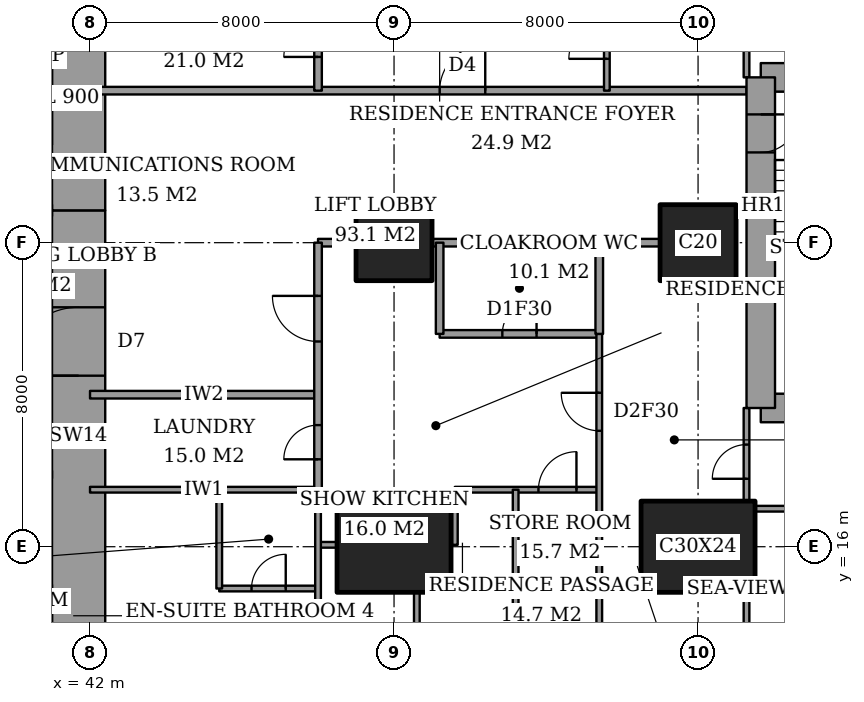
"""IFC4 building model, lengths in metres.
Left out: names, types, materials, properties, quantities, classifications, styles, units other than length and angle.
Written with IfcOpenShell. Run it as: python <this file> out.ifc"""

import sys

from ifc_helpers import new_model, si_unit, direction, frame, frame_2d, origin, origin_2d, place, context, subcontext, project, spatial, rectangle, extrude, element, fill, save


model = new_model("IFC4")
c1 = context("Model", 3, precision=1e-05, world=origin(), true_north=direction((0.0, 1.0)))
c2 = subcontext(c1, "Body", "Model", "MODEL_VIEW")
j1 = project(units=[si_unit("LENGTHUNIT", "METRE"), si_unit("PLANEANGLEUNIT", "RADIAN")], contexts=[c1])
p1 = place(None, origin())
s1 = spatial("IfcSite", under=j1, at=p1, CompositionType="ELEMENT")
p2 = place(p1, origin())
s2 = spatial("IfcBuilding", under=s1, at=p2, CompositionType="ELEMENT")
p3 = place(p2, frame((0.0, 0.0, 54.8)))
s3 = spatial("IfcBuildingStorey", under=s2, at=p3, CompositionType="ELEMENT", Elevation=54.8)
p4 = place(p3, frame((50.0, 16.0, 0.0), z_axis=(0.0, 0.0, 1.0), x_axis=(1.0, 0.0, 0.0)))
e1 = element("IfcColumn", 1, at=p4, inside=s3, PredefinedType="COLUMN", context=c2, shape_type="SweptSolid", body=[
    extrude(rectangle(XDim=3.0, YDim=2.4, at=origin_2d()), origin(), (0.0, 0.0, 1.0), 3.6),
])
p5 = place(p3, frame((50.0, 24.0, 0.0), z_axis=(0.0, 0.0, 1.0), x_axis=(1.0, 0.0, 0.0)))
e2 = element("IfcColumn", 2, at=p5, inside=s3, PredefinedType="COLUMN", context=c2, shape_type="SweptSolid", body=[
    extrude(rectangle(XDim=2.0, YDim=2.0, at=origin_2d()), origin(), (0.0, 0.0, 1.0), 3.6),
])
p6 = place(p3, frame((58.0, 16.0, 0.0), z_axis=(0.0, 0.0, 1.0), x_axis=(1.0, 0.0, 0.0)))
e3 = element("IfcColumn", 3, at=p6, inside=s3, PredefinedType="COLUMN", context=c2, shape_type="SweptSolid", body=[
    extrude(rectangle(XDim=3.0, YDim=2.4, at=origin_2d()), origin(), (0.0, 0.0, 1.0), 3.6),
])
p7 = place(p3, frame((58.0, 24.0, 0.0), z_axis=(0.0, 0.0, 1.0), x_axis=(1.0, 0.0, 0.0)))
e4 = element("IfcColumn", 4, at=p7, inside=s3, PredefinedType="COLUMN", context=c2, shape_type="SweptSolid", body=[
    extrude(rectangle(XDim=2.0, YDim=2.0, at=origin_2d()), origin(), (0.0, 0.0, 1.0), 3.6),
])
p8 = place(p3, frame((41.7, 13.0, 0.0), z_axis=(0.0, 0.0, 1.0), x_axis=(0.0, 1.0, 0.0)))
e5 = element("IfcWall", 5, at=p8, inside=s3, PredefinedType="SHEAR", context=c2, shape_type="SweptSolid", body=[
    extrude(rectangle(XDim=11.85, YDim=1.4, at=frame_2d((5.925, 0.0))), origin(), (0.0, 0.0, 1.0), 3.6),
])
p9 = place(p8, frame((7.5, 0.0, 0.0)))
e6 = element("IfcOpeningElement", 6, at=p9, cuts=e5, PredefinedType="OPENING", context=c2, shape_type="SweptSolid", body=[
    extrude(rectangle(XDim=1.8, YDim=2.4, at=frame_2d((0.9, 1.2))), frame((0.0, 0.71, 0.0), z_axis=(0.0, -1.0, 0.0), x_axis=(1.0, 0.0, 0.0)), (0.0, 0.0, 1.0), 1.42),
])
p10 = place(p3, frame((41.7, 24.85, 0.0), z_axis=(0.0, 0.0, 1.0), x_axis=(0.0, 1.0, 0.0)))
e7 = element("IfcWall", 7, at=p10, inside=s3, PredefinedType="SHEAR", context=c2, shape_type="SweptSolid", body=[
    extrude(rectangle(XDim=10.15, YDim=1.4, at=frame_2d((5.075, 0.0))), origin(), (0.0, 0.0, 1.0), 3.6),
])
for number, where, z_axis, x_axis in (
    (8, (59.65, 19.65, 0.0), (0.0, 0.0, 1.0), (1.0, 0.0, 0.0)),
    (9, (64.1, 28.35, 0.0), (0.0, 0.0, 1.0), (-1.0, 0.0, 0.0)),
):
    element("IfcWall", number, at=place(p3, frame(where, z_axis=z_axis, x_axis=x_axis)), inside=s3, PredefinedType="SHEAR", context=c2, shape_type="SweptSolid", body=[
        extrude(rectangle(XDim=4.45, YDim=0.75, at=frame_2d((2.225, 0.0))), origin(), (0.0, 0.0, 1.0), 3.6),
    ])
p11 = place(p3, frame((59.65, 28.35, 0.0), z_axis=(0.0, 0.0, 1.0), x_axis=(0.0, -1.0, 0.0)))
e10 = element("IfcWall", 10, at=p11, inside=s3, PredefinedType="SHEAR", context=c2, shape_type="SweptSolid", body=[
    extrude(rectangle(XDim=8.7, YDim=0.75, at=frame_2d((4.35, 0.0))), origin(), (0.0, 0.0, 1.0), 3.6),
])
p12 = place(p11, frame((0.975, 0.0, 0.0)))
e11 = element("IfcOpeningElement", 11, at=p12, cuts=e10, PredefinedType="OPENING", context=c2, shape_type="SweptSolid", body=[
    extrude(rectangle(XDim=1.0, YDim=2.1, at=frame_2d((0.5, 1.05))), frame((0.0, 0.385, 0.0), z_axis=(0.0, -1.0, 0.0), x_axis=(1.0, 0.0, 0.0)), (0.0, 0.0, 1.0), 0.77),
])
p13 = place(p3, frame((45.4, 14.9, 0.0), z_axis=(0.0, 0.0, 1.0), x_axis=(1.0, 0.0, 0.0)))
e12 = element("IfcWall", 12, at=p13, inside=s3, PredefinedType="PARTITIONING", context=c2, shape_type="SweptSolid", body=[
    extrude(rectangle(XDim=2.6, YDim=0.15, at=frame_2d((1.3, 0.0))), origin(), (0.0, 0.0, 1.0), 3.35),
])
p14 = place(p13, frame((0.85, 0.0, 0.0)))
e13 = element("IfcOpeningElement", 13, at=p14, cuts=e12, PredefinedType="OPENING", context=c2, shape_type="SweptSolid", body=[
    extrude(rectangle(XDim=0.9, YDim=2.1, at=frame_2d((0.45, 1.05))), frame((0.0, 0.085, 0.0), z_axis=(0.0, -1.0, 0.0), x_axis=(1.0, 0.0, 0.0)), (0.0, 0.0, 1.0), 0.17),
])
p15 = place(p3, frame((55.4, 15.0, 0.0), z_axis=(0.0, 0.0, 1.0), x_axis=(1.0, 0.0, 0.0)))
e14 = element("IfcWall", 14, at=p15, inside=s3, PredefinedType="PARTITIONING", context=c2, shape_type="SweptSolid", body=[
    extrude(rectangle(XDim=1.1, YDim=0.15, at=frame_2d((0.55, 0.0))), origin(), (0.0, 0.0, 1.0), 3.35),
])
p16 = place(p3, frame((48.0, 16.05, 0.0), z_axis=(0.0, 0.0, 1.0), x_axis=(1.0, 0.0, 0.0)))
e15 = element("IfcWall", 15, at=p16, inside=s3, PredefinedType="PARTITIONING", context=c2, shape_type="SweptSolid", body=[
    extrude(rectangle(XDim=0.5, YDim=0.15, at=frame_2d((0.25, 0.0))), origin(), (0.0, 0.0, 1.0), 2.634),
])
p17 = place(p3, frame((59.5, 17.0, 0.0), z_axis=(0.0, 0.0, 1.0), x_axis=(1.0, 0.0, 0.0)))
e16 = element("IfcWall", 16, at=p17, inside=s3, PredefinedType="PARTITIONING", context=c2, shape_type="SweptSolid", body=[
    extrude(rectangle(XDim=5.15, YDim=0.15, at=frame_2d((2.575, 0.0))), origin(), (0.0, 0.0, 1.0), 3.35),
])
p18 = place(p3, frame((42.0, 17.5, 0.0), z_axis=(0.0, 0.0, 1.0), x_axis=(1.0, 0.0, 0.0)))
e17 = element("IfcWall", 17, at=p18, inside=s3, PredefinedType="PARTITIONING", context=c2, shape_type="SweptSolid", body=[
    extrude(rectangle(XDim=6.0, YDim=0.15, at=frame_2d((3.0, 0.0))), origin(), (0.0, 0.0, 1.0), 3.35),
])
p19 = place(p3, frame((51.6, 17.5, 0.0), z_axis=(0.0, 0.0, 1.0), x_axis=(1.0, 0.0, 0.0)))
e18 = element("IfcWall", 18, at=p19, inside=s3, PredefinedType="PARTITIONING", context=c2, shape_type="SweptSolid", body=[
    extrude(rectangle(XDim=3.8, YDim=0.15, at=frame_2d((1.9, 0.0))), origin(), (0.0, 0.0, 1.0), 3.35),
])
p20 = place(p19, frame((2.2, 0.0, 0.0)))
e19 = element("IfcOpeningElement", 19, at=p20, cuts=e18, PredefinedType="OPENING", context=c2, shape_type="SweptSolid", body=[
    extrude(rectangle(XDim=1.0, YDim=2.1, at=frame_2d((0.5, 1.05))), frame((0.0, 0.085, 0.0), z_axis=(0.0, -1.0, 0.0), x_axis=(1.0, 0.0, 0.0)), (0.0, 0.0, 1.0), 0.17),
])
p21 = place(p3, frame((42.0, 20.0, 0.0), z_axis=(0.0, 0.0, 1.0), x_axis=(1.0, 0.0, 0.0)))
e20 = element("IfcWall", 20, at=p21, inside=s3, PredefinedType="PARTITIONING", context=c2, shape_type="SweptSolid", body=[
    extrude(rectangle(XDim=6.0, YDim=0.2, at=frame_2d((3.0, 0.0))), origin(), (0.0, 0.0, 1.0), 3.35),
])
p22 = place(p3, frame((51.2, 21.6, 0.0), z_axis=(0.0, 0.0, 1.0), x_axis=(1.0, 0.0, 0.0)))
e21 = element("IfcWall", 21, at=p22, inside=s3, PredefinedType="PARTITIONING", context=c2, shape_type="SweptSolid", body=[
    extrude(rectangle(XDim=4.2, YDim=0.2, at=frame_2d((2.1, 0.0))), origin(), (0.0, 0.0, 1.0), 3.35),
])
p23 = place(p22, frame((1.65, 0.0, 0.0)))
e22 = element("IfcOpeningElement", 22, at=p23, cuts=e21, PredefinedType="OPENING", context=c2, shape_type="SweptSolid", body=[
    extrude(rectangle(XDim=0.9, YDim=2.1, at=frame_2d((0.45, 1.05))), frame((0.0, 0.11, 0.0), z_axis=(0.0, -1.0, 0.0), x_axis=(1.0, 0.0, 0.0)), (0.0, 0.0, 1.0), 0.22),
])
p24 = place(p3, frame((48.0, 24.0, 0.0), z_axis=(0.0, 0.0, 1.0), x_axis=(1.0, 0.0, 0.0)))
e23 = element("IfcWall", 23, at=p24, inside=s3, PredefinedType="PARTITIONING", context=c2, shape_type="SweptSolid", body=[
    extrude(rectangle(XDim=1.0, YDim=0.2, at=frame_2d((0.5, 0.0))), origin(), (0.0, 0.0, 1.0), 3.35),
])
p25 = place(p3, frame((51.0, 24.0, 0.0), z_axis=(0.0, 0.0, 1.0), x_axis=(1.0, 0.0, 0.0)))
e24 = element("IfcWall", 24, at=p25, inside=s3, PredefinedType="PARTITIONING", context=c2, shape_type="SweptSolid", body=[
    extrude(rectangle(XDim=6.0, YDim=0.2, at=frame_2d((3.0, 0.0))), origin(), (0.0, 0.0, 1.0), 3.35),
])
p26 = place(p3, frame((42.0, 28.0, 0.0), z_axis=(0.0, 0.0, 1.0), x_axis=(1.0, 0.0, 0.0)))
e25 = element("IfcWall", 25, at=p26, inside=s3, PredefinedType="PARTITIONING", context=c2, shape_type="SweptSolid", body=[
    extrude(rectangle(XDim=17.275, YDim=0.2, at=frame_2d((8.637, 0.0))), origin(), (0.0, 0.0, 1.0), 3.35),
])
p27 = place(p26, frame((9.2, 0.0, 0.0)))
e26 = element("IfcOpeningElement", 26, at=p27, cuts=e25, PredefinedType="OPENING", context=c2, shape_type="SweptSolid", body=[
    extrude(rectangle(XDim=1.2, YDim=2.4, at=frame_2d((0.6, 1.2))), frame((0.0, 0.11, 0.0), z_axis=(0.0, -1.0, 0.0), x_axis=(1.0, 0.0, 0.0)), (0.0, 0.0, 1.0), 0.22),
])
p28 = place(p3, frame((45.4, 14.9, 0.0), z_axis=(0.0, 0.0, 1.0), x_axis=(0.0, 1.0, 0.0)))
e27 = element("IfcWall", 27, at=p28, inside=s3, PredefinedType="PARTITIONING", context=c2, shape_type="SweptSolid", body=[
    extrude(rectangle(XDim=2.6, YDim=0.15, at=frame_2d((1.3, 0.0))), origin(), (0.0, 0.0, 1.0), 3.35),
])
p29 = place(p3, frame((48.0, 17.5, 0.0), z_axis=(0.0, 0.0, 1.0), x_axis=(0.0, 1.0, 0.0)))
e28 = element("IfcWall", 28, at=p29, inside=s3, PredefinedType="PARTITIONING", context=c2, shape_type="SweptSolid", body=[
    extrude(rectangle(XDim=6.5, YDim=0.2, at=frame_2d((3.25, 0.0))), origin(), (0.0, 0.0, 1.0), 3.35),
])
p30 = place(p29, frame((3.9, 0.0, 0.0)))
e29 = element("IfcOpeningElement", 29, at=p30, cuts=e28, PredefinedType="OPENING", context=c2, shape_type="SweptSolid", body=[
    extrude(rectangle(XDim=1.2, YDim=2.4, at=frame_2d((0.6, 1.2))), frame((0.0, 0.11, 0.0), z_axis=(0.0, -1.0, 0.0), x_axis=(1.0, 0.0, 0.0)), (0.0, 0.0, 1.0), 0.22),
])
p31 = place(p29, frame((0.8, 0.0, 0.0)))
e30 = element("IfcOpeningElement", 30, at=p31, cuts=e28, PredefinedType="OPENING", context=c2, shape_type="SweptSolid", body=[
    extrude(rectangle(XDim=0.9, YDim=2.1, at=frame_2d((0.45, 1.05))), frame((0.0, 0.11, 0.0), z_axis=(0.0, -1.0, 0.0), x_axis=(1.0, 0.0, 0.0)), (0.0, 0.0, 1.0), 0.22),
])
p32 = place(p3, frame((48.0, 28.0, 0.0), z_axis=(0.0, 0.0, 1.0), x_axis=(0.0, 1.0, 0.0)))
e31 = element("IfcWall", 31, at=p32, inside=s3, PredefinedType="PARTITIONING", context=c2, shape_type="SweptSolid", body=[
    extrude(rectangle(XDim=3.5, YDim=0.2, at=frame_2d((1.75, 0.0))), origin(), (0.0, 0.0, 1.0), 3.35),
])
p33 = place(p32, frame((0.887, 0.0, 0.0)))
e32 = element("IfcOpeningElement", 32, at=p33, cuts=e31, PredefinedType="OPENING", context=c2, shape_type="SweptSolid", body=[
    extrude(rectangle(XDim=0.9, YDim=2.1, at=frame_2d((0.45, 1.05))), frame((0.0, 0.11, 0.0), z_axis=(0.0, -1.0, 0.0), x_axis=(1.0, 0.0, 0.0)), (0.0, 0.0, 1.0), 0.22),
])
p34 = place(p3, frame((48.0, 10.8, 0.0), z_axis=(0.0, 0.0, 1.0), x_axis=(0.0, 1.0, 0.0)))
e33 = element("IfcWall", 33, at=p34, inside=s3, PredefinedType="PARTITIONING", context=c2, shape_type="SweptSolid", body=[
    extrude(rectangle(XDim=6.7, YDim=0.15, at=frame_2d((3.35, 0.0))), origin(), (0.0, 0.0, 1.0), 3.35),
])
p35 = place(p3, frame((50.6, 10.8, 0.0), z_axis=(0.0, 0.0, 1.0), x_axis=(0.0, 1.0, 0.0)))
e34 = element("IfcWall", 34, at=p35, inside=s3, PredefinedType="PARTITIONING", context=c2, shape_type="SweptSolid", body=[
    extrude(rectangle(XDim=4.0, YDim=0.15, at=frame_2d((2.0, 0.0))), origin(), (0.0, 0.0, 1.0), 3.35),
])
p36 = place(p3, frame((51.2, 21.6, 0.0), z_axis=(0.0, 0.0, 1.0), x_axis=(0.0, 1.0, 0.0)))
e35 = element("IfcWall", 35, at=p36, inside=s3, PredefinedType="PARTITIONING", context=c2, shape_type="SweptSolid", body=[
    extrude(rectangle(XDim=2.4, YDim=0.2, at=frame_2d((1.2, 0.0))), origin(), (0.0, 0.0, 1.0), 3.35),
])
p37 = place(p3, frame((51.6, 16.05, 0.0), z_axis=(0.0, 0.0, 1.0), x_axis=(0.0, 1.0, 0.0)))
e36 = element("IfcWall", 36, at=p37, inside=s3, PredefinedType="PARTITIONING", context=c2, shape_type="SweptSolid", body=[
    extrude(rectangle(XDim=1.45, YDim=0.15, at=frame_2d((0.725, 0.0))), origin(), (0.0, 0.0, 1.0), 3.35),
])
p38 = place(p3, frame((53.2, 10.8, 0.0), z_axis=(0.0, 0.0, 1.0), x_axis=(0.0, 1.0, 0.0)))
e37 = element("IfcWall", 37, at=p38, inside=s3, PredefinedType="PARTITIONING", context=c2, shape_type="SweptSolid", body=[
    extrude(rectangle(XDim=6.7, YDim=0.15, at=frame_2d((3.35, 0.0))), origin(), (0.0, 0.0, 1.0), 3.35),
])
p39 = place(p3, frame((55.4, 21.6, 0.0), z_axis=(0.0, 0.0, 1.0), x_axis=(0.0, 1.0, 0.0)))
e38 = element("IfcWall", 38, at=p39, inside=s3, PredefinedType="PARTITIONING", context=c2, shape_type="SweptSolid", body=[
    extrude(rectangle(XDim=2.4, YDim=0.2, at=frame_2d((1.2, 0.0))), origin(), (0.0, 0.0, 1.0), 3.35),
])
p40 = place(p3, frame((55.4, 10.8, 0.0), z_axis=(0.0, 0.0, 1.0), x_axis=(0.0, 1.0, 0.0)))
e39 = element("IfcWall", 39, at=p40, inside=s3, PredefinedType="PARTITIONING", context=c2, shape_type="SweptSolid", body=[
    extrude(rectangle(XDim=10.8, YDim=0.15, at=frame_2d((5.4, 0.0))), origin(), (0.0, 0.0, 1.0), 3.35),
])
p41 = place(p40, frame((8.25, 0.0, 0.0)))
e40 = element("IfcOpeningElement", 40, at=p41, cuts=e39, PredefinedType="OPENING", context=c2, shape_type="SweptSolid", body=[
    extrude(rectangle(XDim=1.0, YDim=2.1, at=frame_2d((0.5, 1.05))), frame((0.0, 0.085, 0.0), z_axis=(0.0, -1.0, 0.0), x_axis=(1.0, 0.0, 0.0)), (0.0, 0.0, 1.0), 0.17),
])
p42 = place(p3, frame((55.6, 28.0, 0.0), z_axis=(0.0, 0.0, 1.0), x_axis=(0.0, 1.0, 0.0)))
e41 = element("IfcWall", 41, at=p42, inside=s3, PredefinedType="PARTITIONING", context=c2, shape_type="SweptSolid", body=[
    extrude(rectangle(XDim=9.0, YDim=0.15, at=frame_2d((4.5, 0.0))), origin(), (0.0, 0.0, 1.0), 3.35),
])
p43 = place(p42, frame((0.837, 0.0, 0.0)))
e42 = element("IfcOpeningElement", 42, at=p43, cuts=e41, PredefinedType="OPENING", context=c2, shape_type="SweptSolid", body=[
    extrude(rectangle(XDim=1.0, YDim=2.1, at=frame_2d((0.5, 1.05))), frame((0.0, 0.085, 0.0), z_axis=(0.0, -1.0, 0.0), x_axis=(1.0, 0.0, 0.0)), (0.0, 0.0, 1.0), 0.17),
])
p44 = place(p3, frame((59.275, 10.8, 0.0), z_axis=(0.0, 0.0, 1.0), x_axis=(0.0, 1.0, 0.0)))
e43 = element("IfcWall", 43, at=p44, inside=s3, PredefinedType="PARTITIONING", context=c2, shape_type="SweptSolid", body=[
    extrude(rectangle(XDim=4.0, YDim=0.15, at=frame_2d((2.0, 0.0))), origin(), (0.0, 0.0, 1.0), 3.35),
])
p45 = place(p3, frame((59.275, 17.2, 0.0), z_axis=(0.0, 0.0, 1.0), x_axis=(0.0, 1.0, 0.0)))
e44 = element("IfcWall", 44, at=p45, inside=s3, PredefinedType="PARTITIONING", context=c2, shape_type="SweptSolid", body=[
    extrude(rectangle(XDim=2.45, YDim=0.15, at=frame_2d((1.225, 0.0))), origin(), (0.0, 0.0, 1.0), 3.35),
])
p46 = place(p45, frame((0.587, 0.0, 0.0)))
e45 = element("IfcOpeningElement", 45, at=p46, cuts=e44, PredefinedType="OPENING", context=c2, shape_type="SweptSolid", body=[
    extrude(rectangle(XDim=0.9, YDim=2.1, at=frame_2d((0.45, 1.05))), frame((0.0, 0.085, 0.0), z_axis=(0.0, -1.0, 0.0), x_axis=(1.0, 0.0, 0.0)), (0.0, 0.0, 1.0), 0.17),
])
p47 = place(p3, frame((59.275, 28.35, 0.0), z_axis=(0.0, 0.0, 1.0), x_axis=(0.0, 1.0, 0.0)))
e46 = element("IfcWall", 46, at=p47, inside=s3, PredefinedType="PARTITIONING", context=c2, shape_type="SweptSolid", body=[
    extrude(rectangle(XDim=2.45, YDim=0.15, at=frame_2d((1.225, 0.0))), origin(), (0.0, 0.0, 1.0), 3.35),
])
p48 = place(p47, frame((0.913, 0.0, 0.0)))
e47 = element("IfcOpeningElement", 47, at=p48, cuts=e46, PredefinedType="OPENING", context=c2, shape_type="SweptSolid", body=[
    extrude(rectangle(XDim=1.0, YDim=2.1, at=frame_2d((0.5, 1.05))), frame((0.0, 0.085, 0.0), z_axis=(0.0, -1.0, 0.0), x_axis=(1.0, 0.0, 0.0)), (0.0, 0.0, 1.0), 0.17),
])
p49 = place(p3, frame((28.3, 17.9, 0.0), z_axis=(0.0, 0.0, 1.0), x_axis=(1.0, 0.0, 0.0)))
e48 = element("IfcWall", 48, at=p49, inside=s3, PredefinedType="PARTITIONING", context=c2, shape_type="SweptSolid", body=[
    extrude(rectangle(XDim=12.7, YDim=0.2, at=frame_2d((6.35, 0.0))), origin(), (0.0, 0.0, 1.0), 3.6),
])
p50 = place(p49, frame((0.95, 0.0, 0.0)))
e49 = element("IfcOpeningElement", 49, at=p50, cuts=e48, PredefinedType="OPENING", context=c2, shape_type="SweptSolid", body=[
    extrude(rectangle(XDim=1.1, YDim=2.1, at=frame_2d((0.55, 1.05))), frame((0.0, 0.11, 0.0), z_axis=(0.0, -1.0, 0.0), x_axis=(1.0, 0.0, 0.0)), (0.0, 0.0, 1.0), 0.22),
])
p51 = place(p49, frame((4.15, 0.0, 0.0)))
e50 = element("IfcOpeningElement", 50, at=p51, cuts=e48, PredefinedType="OPENING", context=c2, shape_type="SweptSolid", body=[
    extrude(rectangle(XDim=1.1, YDim=2.1, at=frame_2d((0.55, 1.05))), frame((0.0, 0.11, 0.0), z_axis=(0.0, -1.0, 0.0), x_axis=(1.0, 0.0, 0.0)), (0.0, 0.0, 1.0), 0.22),
])
p52 = place(p49, frame((7.35, 0.0, 0.0)))
e51 = element("IfcOpeningElement", 51, at=p52, cuts=e48, PredefinedType="OPENING", context=c2, shape_type="SweptSolid", body=[
    extrude(rectangle(XDim=1.1, YDim=2.1, at=frame_2d((0.55, 1.05))), frame((0.0, 0.11, 0.0), z_axis=(0.0, -1.0, 0.0), x_axis=(1.0, 0.0, 0.0)), (0.0, 0.0, 1.0), 0.22),
])
p53 = place(p49, frame((10.6, 0.0, 0.0)))
e52 = element("IfcOpeningElement", 52, at=p53, cuts=e48, PredefinedType="OPENING", context=c2, shape_type="SweptSolid", body=[
    extrude(rectangle(XDim=1.2, YDim=2.1, at=frame_2d((0.6, 1.05))), frame((0.0, 0.11, 0.0), z_axis=(0.0, -1.0, 0.0), x_axis=(1.0, 0.0, 0.0)), (0.0, 0.0, 1.0), 0.22),
])
p54 = place(p46, origin())
e53 = element("IfcDoor", 53, at=p54, inside=s3, OperationType="SINGLE_SWING_RIGHT", PredefinedType="DOOR", context=c2, shape_type="SweptSolid", body=[
    extrude(rectangle(XDim=0.9, YDim=2.1, at=frame_2d((0.45, 1.05))), frame((0.0, 0.025, 0.0), z_axis=(0.0, -1.0, 0.0), x_axis=(1.0, 0.0, 0.0)), (0.0, 0.0, 1.0), 0.05),
])
fill(e45, e53)
p55 = place(p41, origin())
e54 = element("IfcDoor", 54, at=p55, inside=s3, OperationType="SINGLE_SWING_LEFT", PredefinedType="DOOR", context=c2, shape_type="SweptSolid", body=[
    extrude(rectangle(XDim=1.0, YDim=2.1, at=frame_2d((0.5, 1.05))), frame((0.0, 0.025, 0.0), z_axis=(0.0, -1.0, 0.0), x_axis=(1.0, 0.0, 0.0)), (0.0, 0.0, 1.0), 0.05),
])
fill(e40, e54)
p56 = place(p23, origin())
e55 = element("IfcDoor", 55, at=p56, inside=s3, OperationType="SINGLE_SWING_LEFT", PredefinedType="DOOR", context=c2, shape_type="SweptSolid", body=[
    extrude(rectangle(XDim=0.9, YDim=2.1, at=frame_2d((0.45, 1.05))), frame((0.0, 0.025, 0.0), z_axis=(0.0, -1.0, 0.0), x_axis=(1.0, 0.0, 0.0)), (0.0, 0.0, 1.0), 0.05),
])
fill(e22, e55)
p57 = place(p30, origin())
e56 = element("IfcDoor", 56, at=p57, inside=s3, OperationType="SINGLE_SWING_LEFT", PredefinedType="DOOR", context=c2, shape_type="SweptSolid", body=[
    extrude(rectangle(XDim=1.2, YDim=2.4, at=frame_2d((0.6, 1.2))), frame((0.0, 0.025, 0.0), z_axis=(0.0, -1.0, 0.0), x_axis=(1.0, 0.0, 0.0)), (0.0, 0.0, 1.0), 0.05),
])
fill(e29, e56)
p58 = place(p20, origin())
e57 = element("IfcDoor", 57, at=p58, inside=s3, OperationType="SINGLE_SWING_LEFT", PredefinedType="DOOR", context=c2, shape_type="SweptSolid", body=[
    extrude(rectangle(XDim=1.0, YDim=2.1, at=frame_2d((0.5, 1.05))), frame((0.0, 0.025, 0.0), z_axis=(0.0, -1.0, 0.0), x_axis=(1.0, 0.0, 0.0)), (0.0, 0.0, 1.0), 0.05),
])
fill(e19, e57)
p59 = place(p14, origin())
e58 = element("IfcDoor", 58, at=p59, inside=s3, OperationType="SINGLE_SWING_LEFT", PredefinedType="DOOR", context=c2, shape_type="SweptSolid", body=[
    extrude(rectangle(XDim=0.9, YDim=2.1, at=frame_2d((0.45, 1.05))), frame((0.0, 0.025, 0.0), z_axis=(0.0, -1.0, 0.0), x_axis=(1.0, 0.0, 0.0)), (0.0, 0.0, 1.0), 0.05),
])
fill(e13, e58)
p60 = place(p31, origin())
e59 = element("IfcDoor", 59, at=p60, inside=s3, OperationType="SINGLE_SWING_RIGHT", PredefinedType="DOOR", context=c2, shape_type="SweptSolid", body=[
    extrude(rectangle(XDim=0.9, YDim=2.1, at=frame_2d((0.45, 1.05))), frame((0.0, 0.025, 0.0), z_axis=(0.0, -1.0, 0.0), x_axis=(1.0, 0.0, 0.0)), (0.0, 0.0, 1.0), 0.05),
])
fill(e30, e59)
p61 = place(p43, origin())
e60 = element("IfcDoor", 60, at=p61, inside=s3, OperationType="SINGLE_SWING_RIGHT", PredefinedType="DOOR", context=c2, shape_type="SweptSolid", body=[
    extrude(rectangle(XDim=1.0, YDim=2.1, at=frame_2d((0.5, 1.05))), frame((0.0, 0.025, 0.0), z_axis=(0.0, -1.0, 0.0), x_axis=(1.0, 0.0, 0.0)), (0.0, 0.0, 1.0), 0.05),
])
fill(e42, e60)
p62 = place(p27, origin())
e61 = element("IfcDoor", 61, at=p62, inside=s3, OperationType="SINGLE_SWING_LEFT", PredefinedType="DOOR", context=c2, shape_type="SweptSolid", body=[
    extrude(rectangle(XDim=1.2, YDim=2.4, at=frame_2d((0.6, 1.2))), frame((0.0, 0.025, 0.0), z_axis=(0.0, -1.0, 0.0), x_axis=(1.0, 0.0, 0.0)), (0.0, 0.0, 1.0), 0.05),
])
fill(e26, e61)
p63 = place(p33, origin())
e62 = element("IfcDoor", 62, at=p63, inside=s3, OperationType="SINGLE_SWING_RIGHT", PredefinedType="DOOR", context=c2, shape_type="SweptSolid", body=[
    extrude(rectangle(XDim=0.9, YDim=2.1, at=frame_2d((0.45, 1.05))), frame((0.0, 0.025, 0.0), z_axis=(0.0, -1.0, 0.0), x_axis=(1.0, 0.0, 0.0)), (0.0, 0.0, 1.0), 0.05),
])
fill(e32, e62)
p64 = place(p9, origin())
e63 = element("IfcDoor", 63, at=p64, inside=s3, OperationType="DOUBLE_DOOR_DOUBLE_SWING", PredefinedType="DOOR", context=c2, shape_type="SweptSolid", body=[
    extrude(rectangle(XDim=1.8, YDim=2.4, at=frame_2d((0.9, 1.2))), frame((0.0, 0.025, 0.0), z_axis=(0.0, -1.0, 0.0), x_axis=(1.0, 0.0, 0.0)), (0.0, 0.0, 1.0), 0.05),
])
fill(e6, e63)
p65 = place(p12, origin())
e64 = element("IfcDoor", 64, at=p65, inside=s3, OperationType="SINGLE_SWING_RIGHT", PredefinedType="DOOR", context=c2, shape_type="SweptSolid", body=[
    extrude(rectangle(XDim=1.0, YDim=2.1, at=frame_2d((0.5, 1.05))), frame((0.0, 0.025, 0.0), z_axis=(0.0, -1.0, 0.0), x_axis=(1.0, 0.0, 0.0)), (0.0, 0.0, 1.0), 0.05),
])
fill(e11, e64)
save(model, sys.argv[1])
